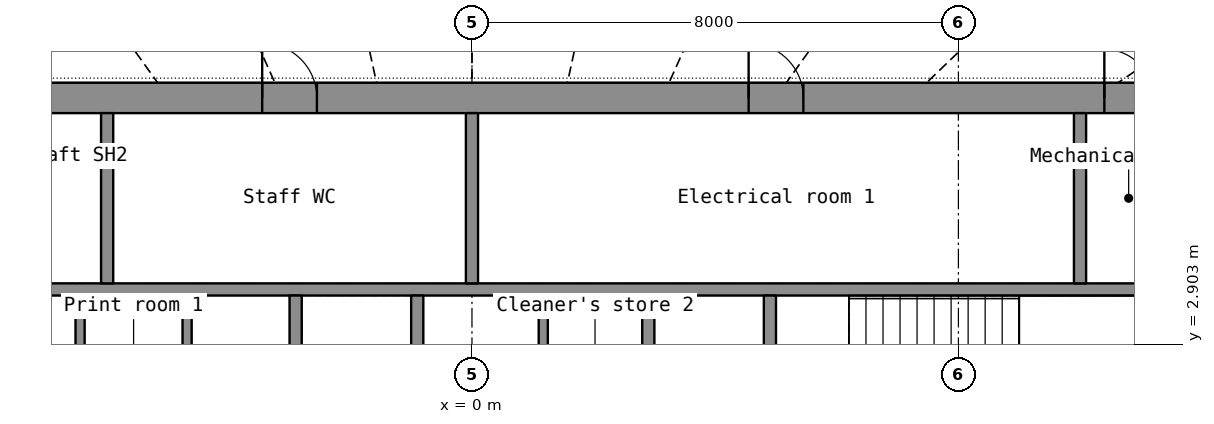
"""IFC4 building model, lengths in metres.
Left out: names, types, materials, properties, quantities, classifications, styles, units other than length and angle.
Written with IfcOpenShell. Run it as: python <this file> out.ifc"""

import sys

from ifc_helpers import new_model, si_unit, direction, frame, frame_2d, origin, place, context, subcontext, project, spatial, rectangle, extrude, element, fill, save


model = new_model("IFC4")
c1 = context("Model", 3, precision=1e-05, world=origin(), true_north=direction((0.0, 1.0)))
c2 = subcontext(c1, "Body", "Model", "MODEL_VIEW")
j1 = project(units=[si_unit("LENGTHUNIT", "METRE"), si_unit("PLANEANGLEUNIT", "RADIAN")], contexts=[c1])
p1 = place(None, origin())
s1 = spatial("IfcSite", under=j1, at=p1, CompositionType="ELEMENT")
p2 = place(p1, origin())
s2 = spatial("IfcBuilding", under=s1, at=p2, CompositionType="ELEMENT")
p3 = place(p2, frame((0.0, 0.0, 97.1)))
s3 = spatial("IfcBuildingStorey", under=s2, at=p3, CompositionType="ELEMENT", Elevation=97.1)
p4 = place(p3, frame((-11.5, 6.95, 0.0), z_axis=(0.0, 0.0, 1.0), x_axis=(1.0, 0.0, 0.0)))
e1 = element("IfcWall", 1, at=p4, inside=s3, PredefinedType="SHEAR", context=c2, shape_type="SweptSolid", body=[
    extrude(rectangle(XDim=23.0, YDim=0.5, at=frame_2d((11.5, 0.0))), origin(), (0.0, 0.0, 1.0), 3.3),
])
p5 = place(p4, frame((1.95, 0.0, 0.0)))
e2 = element("IfcOpeningElement", 2, at=p5, cuts=e1, PredefinedType="OPENING", context=c2, shape_type="SweptSolid", body=[
    extrude(rectangle(XDim=1.1, YDim=2.2, at=frame_2d((0.55, 1.1))), frame((0.0, 0.26, 0.0), z_axis=(0.0, -1.0, 0.0), x_axis=(1.0, 0.0, 0.0)), (0.0, 0.0, 1.0), 0.52),
])
p6 = place(p4, frame((8.05, 0.0, 0.0)))
e3 = element("IfcOpeningElement", 3, at=p6, cuts=e1, PredefinedType="OPENING", context=c2, shape_type="SweptSolid", body=[
    extrude(rectangle(XDim=0.9, YDim=2.1, at=frame_2d((0.45, 1.05))), frame((0.0, 0.26, 0.0), z_axis=(0.0, -1.0, 0.0), x_axis=(1.0, 0.0, 0.0)), (0.0, 0.0, 1.0), 0.52),
])
p7 = place(p4, frame((16.05, 0.0, 0.0)))
e4 = element("IfcOpeningElement", 4, at=p7, cuts=e1, PredefinedType="OPENING", context=c2, shape_type="SweptSolid", body=[
    extrude(rectangle(XDim=0.9, YDim=2.1, at=frame_2d((0.45, 1.05))), frame((0.0, 0.26, 0.0), z_axis=(0.0, -1.0, 0.0), x_axis=(1.0, 0.0, 0.0)), (0.0, 0.0, 1.0), 0.52),
])
p8 = place(p4, frame((0.3, 0.0, 0.0)))
e5 = element("IfcOpeningElement", 5, at=p8, cuts=e1, PredefinedType="OPENING", context=c2, shape_type="SweptSolid", body=[
    extrude(rectangle(XDim=0.8, YDim=2.05, at=frame_2d((0.4, 1.025))), frame((0.0, 0.26, 0.0), z_axis=(0.0, -1.0, 0.0), x_axis=(1.0, 0.0, 0.0)), (0.0, 0.0, 1.0), 0.52),
])
p9 = place(p4, frame((21.9, 0.0, 0.0)))
e6 = element("IfcOpeningElement", 6, at=p9, cuts=e1, PredefinedType="OPENING", context=c2, shape_type="SweptSolid", body=[
    extrude(rectangle(XDim=0.8, YDim=2.05, at=frame_2d((0.4, 1.025))), frame((0.0, 0.26, 0.0), z_axis=(0.0, -1.0, 0.0), x_axis=(1.0, 0.0, 0.0)), (0.0, 0.0, 1.0), 0.52),
])
p10 = place(p3, frame((-11.5, 3.8, 0.0), z_axis=(0.0, 0.0, 1.0), x_axis=(1.0, 0.0, 0.0)))
e7 = element("IfcWall", 7, at=p10, inside=s3, PredefinedType="SHEAR", context=c2, shape_type="SweptSolid", body=[
    extrude(rectangle(XDim=23.0, YDim=0.2, at=frame_2d((11.5, 0.0))), origin(), (0.0, 0.0, 1.0), 3.3),
])
for number, where, z_axis, x_axis in (
    (8, (-6.0, 3.9, 0.0), (0.0, 0.0, 1.0), (0.0, 1.0, 0.0)),
    (9, (10.0, 3.9, 0.0), (0.0, 0.0, 1.0), (0.0, 1.0, 0.0)),
):
    element("IfcWall", number, at=place(p3, frame(where, z_axis=z_axis, x_axis=x_axis)), inside=s3, PredefinedType="SHEAR", context=c2, shape_type="SweptSolid", body=[
        extrude(rectangle(XDim=2.8, YDim=0.2, at=frame_2d((1.4, 0.0))), origin(), (0.0, 0.0, 1.0), 3.3),
    ])
p11 = place(p3, frame((0.0, 3.9, 0.0), z_axis=(0.0, 0.0, 1.0), x_axis=(0.0, 1.0, 0.0)))
e10 = element("IfcWall", 10, at=p11, inside=s3, PredefinedType="PARTITIONING", context=c2, shape_type="SweptSolid", body=[
    extrude(rectangle(XDim=2.8, YDim=0.2, at=frame_2d((1.4, 0.0))), origin(), (0.0, 0.0, 1.0), 3.3),
])
p12 = place(p3, frame((-2.9, -3.7, 0.0), z_axis=(0.0, 0.0, 1.0), x_axis=(0.0, 1.0, 0.0)))
e11 = element("IfcWall", 11, at=p12, inside=s3, PredefinedType="SHEAR", context=c2, shape_type="SweptSolid", body=[
    extrude(rectangle(XDim=7.4, YDim=0.2, at=frame_2d((3.7, 0.0))), origin(), (0.0, 0.0, 1.0), 3.3),
])
p13 = place(p12, frame((3.1, 0.0, 0.0)))
e12 = element("IfcOpeningElement", 12, at=p13, cuts=e11, PredefinedType="OPENING", context=c2, shape_type="SweptSolid", body=[
    extrude(rectangle(XDim=1.2, YDim=2.2, at=frame_2d((0.6, 1.1))), frame((0.0, 0.11, 0.0), z_axis=(0.0, -1.0, 0.0), x_axis=(1.0, 0.0, 0.0)), (0.0, 0.0, 1.0), 0.22),
])
p14 = place(p3, frame((2.9, -3.7, 0.0), z_axis=(0.0, 0.0, 1.0), x_axis=(0.0, 1.0, 0.0)))
e13 = element("IfcWall", 13, at=p14, inside=s3, PredefinedType="SHEAR", context=c2, shape_type="SweptSolid", body=[
    extrude(rectangle(XDim=7.4, YDim=0.2, at=frame_2d((3.7, 0.0))), origin(), (0.0, 0.0, 1.0), 3.3),
])
p15 = place(p14, frame((3.1, 0.0, 0.0)))
e14 = element("IfcOpeningElement", 14, at=p15, cuts=e13, PredefinedType="OPENING", context=c2, shape_type="SweptSolid", body=[
    extrude(rectangle(XDim=1.2, YDim=2.2, at=frame_2d((0.6, 1.1))), frame((0.0, 0.11, 0.0), z_axis=(0.0, -1.0, 0.0), x_axis=(1.0, 0.0, 0.0)), (0.0, 0.0, 1.0), 0.22),
])
for number, where, z_axis, x_axis in (
    (15, (-0.9, 1.35, 0.0), (0.0, 0.0, 1.0), (0.0, 1.0, 0.0)),
    (16, (4.9, 1.35, 0.0), (0.0, 0.0, 1.0), (0.0, 1.0, 0.0)),
):
    element("IfcWall", number, at=place(p3, frame(where, z_axis=z_axis, x_axis=x_axis)), inside=s3, PredefinedType="SHEAR", context=c2, shape_type="SweptSolid", body=[
        extrude(rectangle(XDim=2.35, YDim=0.2, at=frame_2d((1.175, 0.0))), origin(), (0.0, 0.0, 1.0), 3.3),
    ])
for number, where, z_axis, x_axis in (
    (17, (-6.445, 1.35, 0.0), (0.0, 0.0, 1.0), (0.0, 1.0, 0.0)),
    (18, (-4.685, 1.35, 0.0), (0.0, 0.0, 1.0), (0.0, 1.0, 0.0)),
    (19, (1.173, 1.35, 0.0), (0.0, 0.0, 1.0), (0.0, 1.0, 0.0)),
):
    element("IfcWall", number, at=place(p3, frame(where, z_axis=z_axis, x_axis=x_axis)), inside=s3, PredefinedType="PARTITIONING", context=c2, shape_type="SweptSolid", body=[
        extrude(rectangle(XDim=2.35, YDim=0.15, at=frame_2d((1.175, 0.0))), origin(), (0.0, 0.0, 1.0), 3.3),
    ])
p16 = place(p6, origin())
e20 = element("IfcDoor", 20, at=p16, inside=s3, OperationType="SINGLE_SWING_LEFT", PredefinedType="DOOR", context=c2, shape_type="SweptSolid", body=[
    extrude(rectangle(XDim=0.9, YDim=2.1, at=frame_2d((0.45, 1.05))), frame((0.0, 0.025, 0.0), z_axis=(0.0, -1.0, 0.0), x_axis=(1.0, 0.0, 0.0)), (0.0, 0.0, 1.0), 0.05),
])
fill(e3, e20)
p17 = place(p7, origin())
e21 = element("IfcDoor", 21, at=p17, inside=s3, OperationType="SINGLE_SWING_LEFT", PredefinedType="DOOR", context=c2, shape_type="SweptSolid", body=[
    extrude(rectangle(XDim=0.9, YDim=2.1, at=frame_2d((0.45, 1.05))), frame((0.0, 0.025, 0.0), z_axis=(0.0, -1.0, 0.0), x_axis=(1.0, 0.0, 0.0)), (0.0, 0.0, 1.0), 0.05),
])
fill(e4, e21)
p18 = place(p9, origin())
e22 = element("IfcDoor", 22, at=p18, inside=s3, OperationType="SINGLE_SWING_LEFT", PredefinedType="DOOR", context=c2, shape_type="SweptSolid", body=[
    extrude(rectangle(XDim=0.8, YDim=2.05, at=frame_2d((0.4, 1.025))), frame((0.0, 0.025, 0.0), z_axis=(0.0, -1.0, 0.0), x_axis=(1.0, 0.0, 0.0)), (0.0, 0.0, 1.0), 0.05),
])
fill(e6, e22)
save(model, sys.argv[1])
